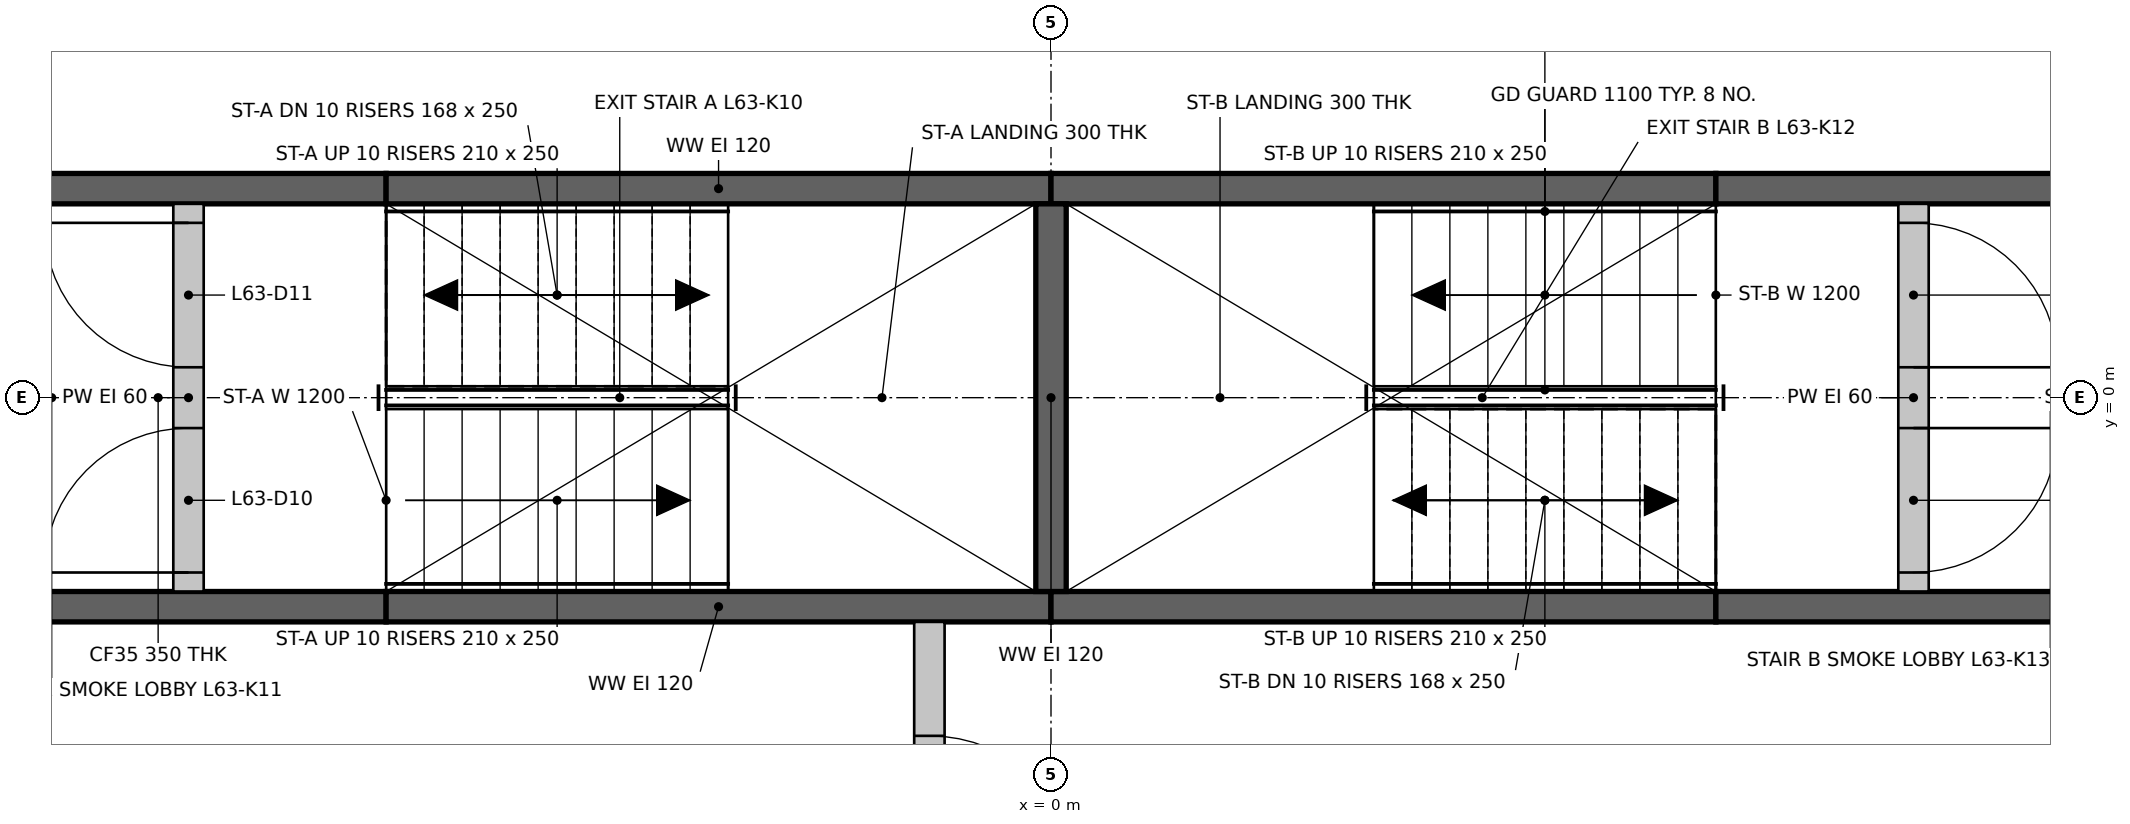
"""IFC4 building model, lengths in metres.
Left out: names, types, materials, properties, quantities, classifications, styles, units other than length and angle.
Written with IfcOpenShell. Run it as: python <this file> out.ifc"""

import sys

from ifc_helpers import new_model, si_unit, direction, frame, frame_2d, origin, place, context, subcontext, project, spatial, rectangle, extrude, element, fill, save


model = new_model("IFC4")
c1 = context("Model", 3, precision=1e-05, world=origin(), true_north=direction((0.0, 1.0)))
c2 = subcontext(c1, "Body", "Model", "MODEL_VIEW")
j1 = project(units=[si_unit("LENGTHUNIT", "METRE"), si_unit("PLANEANGLEUNIT", "RADIAN")], contexts=[c1])
p1 = place(None, origin())
s1 = spatial("IfcSite", under=j1, at=p1, CompositionType="ELEMENT")
p2 = place(p1, origin())
s2 = spatial("IfcBuilding", under=s1, at=p2, CompositionType="ELEMENT")
p3 = place(p2, frame((0.0, 0.0, 231.2)))
s3 = spatial("IfcBuildingStorey", under=s2, at=p3, CompositionType="ELEMENT", Elevation=231.2)
p4 = place(p3, frame((-7.374, -1.375, 0.0), z_axis=(0.0, 0.0, 1.0), x_axis=(1.0, 0.0, 0.0)))
e1 = element("IfcWall", 1, at=p4, inside=s3, PredefinedType="SHEAR", context=c2, shape_type="SweptSolid", body=[
    extrude(rectangle(XDim=3.0, YDim=0.2, at=frame_2d((1.5, 0.0))), origin(), (0.0, 0.0, 1.0), 3.3),
])
for number, where, z_axis, x_axis in (
    (2, (-4.374, -1.375, 0.0), (0.0, 0.0, 1.0), (1.0, 0.0, 0.0)),
    (3, (0.0, -1.375, 0.0), (0.0, 0.0, 1.0), (1.0, 0.0, 0.0)),
):
    element("IfcWall", number, at=place(p3, frame(where, z_axis=z_axis, x_axis=x_axis)), inside=s3, PredefinedType="SHEAR", context=c2, shape_type="SweptSolid", body=[
        extrude(rectangle(XDim=4.374, YDim=0.2, at=frame_2d((2.187, 0.0))), origin(), (0.0, 0.0, 1.0), 3.3),
    ])
for number, where, z_axis, x_axis in (
    (4, (4.374, -1.375, 0.0), (0.0, 0.0, 1.0), (1.0, 0.0, 0.0)),
    (5, (-7.374, 1.375, 0.0), (0.0, 0.0, 1.0), (1.0, 0.0, 0.0)),
):
    element("IfcWall", number, at=place(p3, frame(where, z_axis=z_axis, x_axis=x_axis)), inside=s3, PredefinedType="SHEAR", context=c2, shape_type="SweptSolid", body=[
        extrude(rectangle(XDim=3.0, YDim=0.2, at=frame_2d((1.5, 0.0))), origin(), (0.0, 0.0, 1.0), 3.3),
    ])
for number, where, z_axis, x_axis in (
    (6, (-4.374, 1.375, 0.0), (0.0, 0.0, 1.0), (1.0, 0.0, 0.0)),
    (7, (0.0, 1.375, 0.0), (0.0, 0.0, 1.0), (1.0, 0.0, 0.0)),
):
    element("IfcWall", number, at=place(p3, frame(where, z_axis=z_axis, x_axis=x_axis)), inside=s3, PredefinedType="SHEAR", context=c2, shape_type="SweptSolid", body=[
        extrude(rectangle(XDim=4.374, YDim=0.2, at=frame_2d((2.187, 0.0))), origin(), (0.0, 0.0, 1.0), 3.3),
    ])
p5 = place(p3, frame((4.374, 1.375, 0.0), z_axis=(0.0, 0.0, 1.0), x_axis=(1.0, 0.0, 0.0)))
e8 = element("IfcWall", 8, at=p5, inside=s3, PredefinedType="SHEAR", context=c2, shape_type="SweptSolid", body=[
    extrude(rectangle(XDim=3.0, YDim=0.2, at=frame_2d((1.5, 0.0))), origin(), (0.0, 0.0, 1.0), 3.3),
])
p6 = place(p3, frame((0.0, -1.275, 0.0), z_axis=(0.0, 0.0, 1.0), x_axis=(0.0, 1.0, 0.0)))
e9 = element("IfcWall", 9, at=p6, inside=s3, PredefinedType="SHEAR", context=c2, shape_type="SweptSolid", body=[
    extrude(rectangle(XDim=2.55, YDim=0.2, at=frame_2d((1.275, 0.0))), origin(), (0.0, 0.0, 1.0), 3.3),
])
p7 = place(p3, frame((-0.8, -3.974, 0.0), z_axis=(0.0, 0.0, 1.0), x_axis=(0.0, 1.0, 0.0)))
e10 = element("IfcWall", 10, at=p7, inside=s3, PredefinedType="PARTITIONING", context=c2, shape_type="SweptSolid", body=[
    extrude(rectangle(XDim=2.499, YDim=0.2, at=frame_2d((1.25, 0.0))), origin(), (0.0, 0.0, 1.0), 3.3),
])
p8 = place(p7, frame((0.75, 0.0, 0.0)))
e11 = element("IfcOpeningElement", 11, at=p8, cuts=e10, PredefinedType="OPENING", context=c2, shape_type="SweptSolid", body=[
    extrude(rectangle(XDim=1.0, YDim=2.1, at=frame_2d((0.5, 1.05))), frame((0.0, 0.11, 0.0), z_axis=(0.0, -1.0, 0.0), x_axis=(1.0, 0.0, 0.0)), (0.0, 0.0, 1.0), 0.22),
])
p9 = place(p3, frame((-5.674, -1.275, 0.0), z_axis=(0.0, 0.0, 1.0), x_axis=(0.0, 1.0, 0.0)))
e12 = element("IfcWall", 12, at=p9, inside=s3, PredefinedType="PARTITIONING", context=c2, shape_type="SweptSolid", body=[
    extrude(rectangle(XDim=2.55, YDim=0.2, at=frame_2d((1.275, 0.0))), origin(), (0.0, 0.0, 1.0), 3.3),
])
p10 = place(p9, frame((0.125, 0.0, 0.0)))
e13 = element("IfcOpeningElement", 13, at=p10, cuts=e12, PredefinedType="OPENING", context=c2, shape_type="SweptSolid", body=[
    extrude(rectangle(XDim=0.95, YDim=2.1, at=frame_2d((0.475, 1.05))), frame((0.0, 0.11, 0.0), z_axis=(0.0, -1.0, 0.0), x_axis=(1.0, 0.0, 0.0)), (0.0, 0.0, 1.0), 0.22),
])
p11 = place(p9, frame((1.475, 0.0, 0.0)))
e14 = element("IfcOpeningElement", 14, at=p11, cuts=e12, PredefinedType="OPENING", context=c2, shape_type="SweptSolid", body=[
    extrude(rectangle(XDim=0.95, YDim=2.1, at=frame_2d((0.475, 1.05))), frame((0.0, 0.11, 0.0), z_axis=(0.0, -1.0, 0.0), x_axis=(1.0, 0.0, 0.0)), (0.0, 0.0, 1.0), 0.22),
])
p12 = place(p3, frame((5.674, -1.275, 0.0), z_axis=(0.0, 0.0, 1.0), x_axis=(0.0, 1.0, 0.0)))
e15 = element("IfcWall", 15, at=p12, inside=s3, PredefinedType="PARTITIONING", context=c2, shape_type="SweptSolid", body=[
    extrude(rectangle(XDim=2.55, YDim=0.2, at=frame_2d((1.275, 0.0))), origin(), (0.0, 0.0, 1.0), 3.3),
])
p13 = place(p12, frame((0.125, 0.0, 0.0)))
e16 = element("IfcOpeningElement", 16, at=p13, cuts=e15, PredefinedType="OPENING", context=c2, shape_type="SweptSolid", body=[
    extrude(rectangle(XDim=0.95, YDim=2.1, at=frame_2d((0.475, 1.05))), frame((0.0, 0.11, 0.0), z_axis=(0.0, -1.0, 0.0), x_axis=(1.0, 0.0, 0.0)), (0.0, 0.0, 1.0), 0.22),
])
p14 = place(p12, frame((1.475, 0.0, 0.0)))
e17 = element("IfcOpeningElement", 17, at=p14, cuts=e15, PredefinedType="OPENING", context=c2, shape_type="SweptSolid", body=[
    extrude(rectangle(XDim=0.95, YDim=2.1, at=frame_2d((0.475, 1.05))), frame((0.0, 0.11, 0.0), z_axis=(0.0, -1.0, 0.0), x_axis=(1.0, 0.0, 0.0)), (0.0, 0.0, 1.0), 0.22),
])
p15 = place(p10, origin())
e18 = element("IfcDoor", 18, at=p15, inside=s3, OperationType="SINGLE_SWING_LEFT", PredefinedType="DOOR", context=c2, shape_type="SweptSolid", body=[
    extrude(rectangle(XDim=0.95, YDim=2.1, at=frame_2d((0.475, 1.05))), frame((0.0, 0.025, 0.0), z_axis=(0.0, -1.0, 0.0), x_axis=(1.0, 0.0, 0.0)), (0.0, 0.0, 1.0), 0.05),
])
fill(e13, e18)
p16 = place(p11, origin())
e19 = element("IfcDoor", 19, at=p16, inside=s3, OperationType="SINGLE_SWING_RIGHT", PredefinedType="DOOR", context=c2, shape_type="SweptSolid", body=[
    extrude(rectangle(XDim=0.95, YDim=2.1, at=frame_2d((0.475, 1.05))), frame((0.0, 0.025, 0.0), z_axis=(0.0, -1.0, 0.0), x_axis=(1.0, 0.0, 0.0)), (0.0, 0.0, 1.0), 0.05),
])
fill(e14, e19)
p17 = place(p13, frame((0.95, 0.0, 0.0), z_axis=(0.0, 0.0, 1.0), x_axis=(-1.0, 0.0, 0.0)))
e20 = element("IfcDoor", 20, at=p17, inside=s3, OperationType="SINGLE_SWING_RIGHT", PredefinedType="DOOR", context=c2, shape_type="SweptSolid", body=[
    extrude(rectangle(XDim=0.95, YDim=2.1, at=frame_2d((0.475, 1.05))), frame((0.0, 0.025, 0.0), z_axis=(0.0, -1.0, 0.0), x_axis=(1.0, 0.0, 0.0)), (0.0, 0.0, 1.0), 0.05),
])
fill(e16, e20)
p18 = place(p14, frame((0.95, 0.0, 0.0), z_axis=(0.0, 0.0, 1.0), x_axis=(-1.0, 0.0, 0.0)))
e21 = element("IfcDoor", 21, at=p18, inside=s3, OperationType="SINGLE_SWING_LEFT", PredefinedType="DOOR", context=c2, shape_type="SweptSolid", body=[
    extrude(rectangle(XDim=0.95, YDim=2.1, at=frame_2d((0.475, 1.05))), frame((0.0, 0.025, 0.0), z_axis=(0.0, -1.0, 0.0), x_axis=(1.0, 0.0, 0.0)), (0.0, 0.0, 1.0), 0.05),
])
fill(e17, e21)
p19 = place(p8, frame((1.0, 0.0, 0.0), z_axis=(0.0, 0.0, 1.0), x_axis=(-1.0, 0.0, 0.0)))
e22 = element("IfcDoor", 22, at=p19, inside=s3, OperationType="SINGLE_SWING_LEFT", PredefinedType="DOOR", context=c2, shape_type="SweptSolid", body=[
    extrude(rectangle(XDim=1.0, YDim=2.1, at=frame_2d((0.5, 1.05))), frame((0.0, 0.025, 0.0), z_axis=(0.0, -1.0, 0.0), x_axis=(1.0, 0.0, 0.0)), (0.0, 0.0, 1.0), 0.05),
])
fill(e11, e22)
save(model, sys.argv[1])
